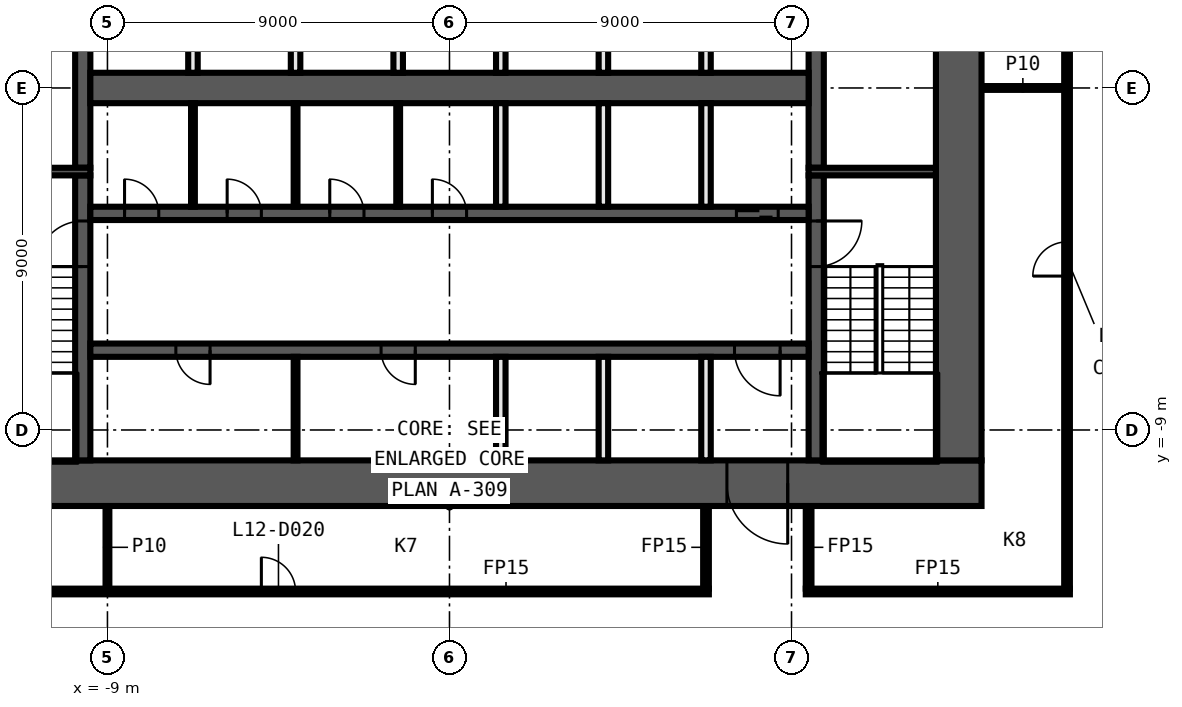
"""IFC4 building model, lengths in metres.
Left out: names, types, materials, properties, quantities, classifications, styles, units other than length and angle.
Written with IfcOpenShell. Run it as: python <this file> out.ifc"""

import sys

from ifc_helpers import new_model, si_unit, direction, frame, frame_2d, origin, place, context, subcontext, project, spatial, rectangle, extrude, element, fill, save


model = new_model("IFC4")
c1 = context("Model", 3, precision=1e-05, world=origin(), true_north=direction((0.0, 1.0)))
c2 = subcontext(c1, "Body", "Model", "MODEL_VIEW")
j1 = project(units=[si_unit("LENGTHUNIT", "METRE"), si_unit("PLANEANGLEUNIT", "RADIAN")], contexts=[c1])
p1 = place(None, origin())
s1 = spatial("IfcSite", under=j1, at=p1, CompositionType="ELEMENT")
p2 = place(p1, origin())
s2 = spatial("IfcBuilding", under=s1, at=p2, CompositionType="ELEMENT")
p3 = place(p2, frame((0.0, 0.0, 66.2)))
s3 = spatial("IfcBuildingStorey", under=s2, at=p3, CompositionType="ELEMENT", Elevation=66.2)
p4 = place(p3, frame((-16.325, -13.25, 0.0), z_axis=(0.0, 0.0, 1.0), x_axis=(1.0, 0.0, 0.0)))
e1 = element("IfcWall", 1, at=p4, inside=s3, PredefinedType="PARTITIONING", context=c2, shape_type="SweptSolid", body=[
    extrude(rectangle(XDim=23.15, YDim=0.15, at=frame_2d((11.575, 0.0))), origin(), (0.0, 0.0, 1.0), 3.3),
])
p5 = place(p4, frame((3.25, 0.0, 0.0)))
e2 = element("IfcOpeningElement", 2, at=p5, cuts=e1, PredefinedType="OPENING", context=c2, shape_type="SweptSolid", body=[
    extrude(rectangle(XDim=0.9, YDim=2.1, at=frame_2d((0.45, 1.05))), frame((0.0, 0.085, 0.0), z_axis=(0.0, -1.0, 0.0), x_axis=(1.0, 0.0, 0.0)), (0.0, 0.0, 1.0), 0.17),
])
p6 = place(p4, frame((11.375, 0.0, 0.0)))
e3 = element("IfcOpeningElement", 3, at=p6, cuts=e1, PredefinedType="OPENING", context=c2, shape_type="SweptSolid", body=[
    extrude(rectangle(XDim=0.9, YDim=2.1, at=frame_2d((0.45, 1.05))), frame((0.0, 0.085, 0.0), z_axis=(0.0, -1.0, 0.0), x_axis=(1.0, 0.0, 0.0)), (0.0, 0.0, 1.0), 0.17),
])
p7 = place(p3, frame((9.375, -13.25, 0.0), z_axis=(0.0, 0.0, 1.0), x_axis=(1.0, 0.0, 0.0)))
e4 = element("IfcWall", 4, at=p7, inside=s3, PredefinedType="PARTITIONING", context=c2, shape_type="SweptSolid", body=[
    extrude(rectangle(XDim=6.95, YDim=0.15, at=frame_2d((3.475, 0.0))), origin(), (0.0, 0.0, 1.0), 3.3),
])
p8 = place(p3, frame((14.0, 0.0, 0.0), z_axis=(0.0, 0.0, 1.0), x_axis=(1.0, 0.0, 0.0)))
e5 = element("IfcWall", 5, at=p8, inside=s3, PredefinedType="PARTITIONING", context=c2, shape_type="SweptSolid", body=[
    extrude(rectangle(XDim=2.175, YDim=0.1, at=frame_2d((1.087, 0.0))), origin(), (0.0, 0.0, 1.0), 3.3),
])
p9 = place(p3, frame((16.25, -13.175, 0.0), z_axis=(0.0, 0.0, 1.0), x_axis=(0.0, 1.0, 0.0)))
e6 = element("IfcWall", 6, at=p9, inside=s3, PredefinedType="PARTITIONING", context=c2, shape_type="SweptSolid", body=[
    extrude(rectangle(XDim=26.35, YDim=0.15, at=frame_2d((13.175, 0.0))), origin(), (0.0, 0.0, 1.0), 3.3),
])
p10 = place(p9, frame((8.225, 0.0, 0.0)))
e7 = element("IfcOpeningElement", 7, at=p10, cuts=e6, PredefinedType="OPENING", context=c2, shape_type="SweptSolid", body=[
    extrude(rectangle(XDim=0.9, YDim=2.1, at=frame_2d((0.45, 1.05))), frame((0.0, 0.085, 0.0), z_axis=(0.0, -1.0, 0.0), x_axis=(1.0, 0.0, 0.0)), (0.0, 0.0, 1.0), 0.17),
])
p11 = place(p9, frame((17.225, 0.0, 0.0)))
e8 = element("IfcOpeningElement", 8, at=p11, cuts=e6, PredefinedType="OPENING", context=c2, shape_type="SweptSolid", body=[
    extrude(rectangle(XDim=0.9, YDim=2.1, at=frame_2d((0.45, 1.05))), frame((0.0, 0.085, 0.0), z_axis=(0.0, -1.0, 0.0), x_axis=(1.0, 0.0, 0.0)), (0.0, 0.0, 1.0), 0.17),
])
for number, where, z_axis, x_axis in (
    (9, (9.45, -13.175, 0.0), (0.0, 0.0, 1.0), (0.0, 1.0, 0.0)),
    (10, (6.75, -13.175, 0.0), (0.0, 0.0, 1.0), (0.0, 1.0, 0.0)),
):
    element("IfcWall", number, at=place(p3, frame(where, z_axis=z_axis, x_axis=x_axis)), inside=s3, PredefinedType="PARTITIONING", context=c2, shape_type="SweptSolid", body=[
        extrude(rectangle(XDim=2.175, YDim=0.15, at=frame_2d((1.087, 0.0))), origin(), (0.0, 0.0, 1.0), 3.3),
    ])
p12 = place(p3, frame((-9.0, -13.175, 0.0), z_axis=(0.0, 0.0, 1.0), x_axis=(0.0, 1.0, 0.0)))
e11 = element("IfcWall", 11, at=p12, inside=s3, PredefinedType="PARTITIONING", context=c2, shape_type="SweptSolid", body=[
    extrude(rectangle(XDim=2.175, YDim=0.1, at=frame_2d((1.087, 0.0))), origin(), (0.0, 0.0, 1.0), 3.3),
])
p13 = place(p3, frame((14.0, -10.4, 0.0), z_axis=(0.0, 0.0, 1.0), x_axis=(-1.0, 0.0, 0.0)))
e12 = element("IfcWall", 12, at=p13, inside=s3, PredefinedType="SHEAR", context=c2, shape_type="SweptSolid", body=[
    extrude(rectangle(XDim=28.0, YDim=1.2, at=frame_2d((14.0, 0.0))), origin(), (0.0, 0.0, 1.0), 3.3),
])
p14 = place(p13, frame((5.1, 0.0, 0.0)))
e13 = element("IfcOpeningElement", 13, at=p14, cuts=e12, PredefinedType="OPENING", context=c2, shape_type="SweptSolid", body=[
    extrude(rectangle(XDim=1.6, YDim=2.1, at=frame_2d((0.8, 1.05))), frame((0.0, 0.61, 0.0), z_axis=(0.0, -1.0, 0.0), x_axis=(1.0, 0.0, 0.0)), (0.0, 0.0, 1.0), 1.22),
])
p15 = place(p3, frame((13.4, 9.8, 0.0), z_axis=(0.0, 0.0, 1.0), x_axis=(0.0, -1.0, 0.0)))
e14 = element("IfcWall", 14, at=p15, inside=s3, PredefinedType="SHEAR", context=c2, shape_type="SweptSolid", body=[
    extrude(rectangle(XDim=19.6, YDim=1.2, at=frame_2d((9.8, 0.0))), origin(), (0.0, 0.0, 1.0), 3.3),
])
p16 = place(p3, frame((9.65, -2.3, 0.0), z_axis=(0.0, 0.0, 1.0), x_axis=(0.0, -1.0, 0.0)))
e15 = element("IfcWall", 15, at=p16, inside=s3, PredefinedType="SHEAR", context=c2, shape_type="SweptSolid", body=[
    extrude(rectangle(XDim=7.5, YDim=0.4, at=frame_2d((3.75, 0.0))), origin(), (0.0, 0.0, 1.0), 3.3),
])
p17 = place(p16, frame((1.2, 0.0, 0.0)))
e16 = element("IfcOpeningElement", 16, at=p17, cuts=e15, PredefinedType="OPENING", context=c2, shape_type="SweptSolid", body=[
    extrude(rectangle(XDim=1.2, YDim=2.1, at=frame_2d((0.6, 1.05))), frame((0.0, 0.21, 0.0), z_axis=(0.0, -1.0, 0.0), x_axis=(1.0, 0.0, 0.0)), (0.0, 0.0, 1.0), 0.42),
])
p18 = place(p3, frame((9.65, 2.1, 0.0), z_axis=(0.0, 0.0, 1.0), x_axis=(0.0, -1.0, 0.0)))
e17 = element("IfcWall", 17, at=p18, inside=s3, PredefinedType="SHEAR", context=c2, shape_type="SweptSolid", body=[
    extrude(rectangle(XDim=4.2, YDim=0.4, at=frame_2d((2.1, 0.0))), origin(), (0.0, 0.0, 1.0), 3.3),
])
p19 = place(p18, frame((0.15, 0.0, 0.0)))
e18 = element("IfcOpeningElement", 18, at=p19, cuts=e17, PredefinedType="OPENING", context=c2, shape_type="SweptSolid", body=[
    extrude(rectangle(XDim=0.9, YDim=2.1, at=frame_2d((0.45, 1.05))), frame((0.0, 0.21, 0.0), z_axis=(0.0, -1.0, 0.0), x_axis=(1.0, 0.0, 0.0)), (0.0, 0.0, 1.0), 0.42),
])
p20 = place(p3, frame((-9.65, -9.8, 0.0), z_axis=(0.0, 0.0, 1.0), x_axis=(0.0, 1.0, 0.0)))
e19 = element("IfcWall", 19, at=p20, inside=s3, PredefinedType="SHEAR", context=c2, shape_type="SweptSolid", body=[
    extrude(rectangle(XDim=7.5, YDim=0.4, at=frame_2d((3.75, 0.0))), origin(), (0.0, 0.0, 1.0), 3.3),
])
p21 = place(p20, frame((5.1, 0.0, 0.0)))
e20 = element("IfcOpeningElement", 20, at=p21, cuts=e19, PredefinedType="OPENING", context=c2, shape_type="SweptSolid", body=[
    extrude(rectangle(XDim=1.2, YDim=2.1, at=frame_2d((0.6, 1.05))), frame((0.0, 0.21, 0.0), z_axis=(0.0, -1.0, 0.0), x_axis=(1.0, 0.0, 0.0)), (0.0, 0.0, 1.0), 0.42),
])
p22 = place(p3, frame((-9.65, -2.1, 0.0), z_axis=(0.0, 0.0, 1.0), x_axis=(0.0, 1.0, 0.0)))
e21 = element("IfcWall", 21, at=p22, inside=s3, PredefinedType="SHEAR", context=c2, shape_type="SweptSolid", body=[
    extrude(rectangle(XDim=4.2, YDim=0.4, at=frame_2d((2.1, 0.0))), origin(), (0.0, 0.0, 1.0), 3.3),
])
for number, where, z_axis, x_axis in (
    (22, (9.45, -2.2, 0.0), (0.0, 0.0, 1.0), (1.0, 0.0, 0.0)),
    (23, (-9.45, -2.2, 0.0), (0.0, 0.0, 1.0), (-1.0, 0.0, 0.0)),
):
    element("IfcWall", number, at=place(p3, frame(where, z_axis=z_axis, x_axis=x_axis)), inside=s3, PredefinedType="SHEAR", context=c2, shape_type="SweptSolid", body=[
        extrude(rectangle(XDim=3.35, YDim=0.2, at=frame_2d((1.675, 0.0))), origin(), (0.0, 0.0, 1.0), 3.3),
    ])
p23 = place(p3, frame((-9.45, -3.3, 0.0), z_axis=(0.0, 0.0, 1.0), x_axis=(1.0, 0.0, 0.0)))
e24 = element("IfcWall", 24, at=p23, inside=s3, PredefinedType="SHEAR", context=c2, shape_type="SweptSolid", body=[
    extrude(rectangle(XDim=18.9, YDim=0.35, at=frame_2d((9.45, 0.0))), origin(), (0.0, 0.0, 1.0), 3.3),
])
p24 = place(p23, frame((17.0, 0.0, 0.0)))
e25 = element("IfcOpeningElement", 25, at=p24, cuts=e24, PredefinedType="OPENING", context=c2, shape_type="SweptSolid", body=[
    extrude(rectangle(XDim=1.1, YDim=2.1, at=frame_2d((0.55, 1.05))), frame((0.0, 0.185, 0.0), z_axis=(0.0, -1.0, 0.0), x_axis=(1.0, 0.0, 0.0)), (0.0, 0.0, 1.0), 0.37),
])
p25 = place(p23, frame((0.9, 0.0, 0.0)))
e26 = element("IfcOpeningElement", 26, at=p25, cuts=e24, PredefinedType="OPENING", context=c2, shape_type="SweptSolid", body=[
    extrude(rectangle(XDim=0.9, YDim=2.1, at=frame_2d((0.45, 1.05))), frame((0.0, 0.185, 0.0), z_axis=(0.0, -1.0, 0.0), x_axis=(1.0, 0.0, 0.0)), (0.0, 0.0, 1.0), 0.37),
])
p26 = place(p23, frame((3.6, 0.0, 0.0)))
e27 = element("IfcOpeningElement", 27, at=p26, cuts=e24, PredefinedType="OPENING", context=c2, shape_type="SweptSolid", body=[
    extrude(rectangle(XDim=0.9, YDim=2.1, at=frame_2d((0.45, 1.05))), frame((0.0, 0.185, 0.0), z_axis=(0.0, -1.0, 0.0), x_axis=(1.0, 0.0, 0.0)), (0.0, 0.0, 1.0), 0.37),
])
p27 = place(p23, frame((6.3, 0.0, 0.0)))
e28 = element("IfcOpeningElement", 28, at=p27, cuts=e24, PredefinedType="OPENING", context=c2, shape_type="SweptSolid", body=[
    extrude(rectangle(XDim=0.9, YDim=2.1, at=frame_2d((0.45, 1.05))), frame((0.0, 0.185, 0.0), z_axis=(0.0, -1.0, 0.0), x_axis=(1.0, 0.0, 0.0)), (0.0, 0.0, 1.0), 0.37),
])
p28 = place(p23, frame((9.0, 0.0, 0.0)))
e29 = element("IfcOpeningElement", 29, at=p28, cuts=e24, PredefinedType="OPENING", context=c2, shape_type="SweptSolid", body=[
    extrude(rectangle(XDim=0.9, YDim=2.1, at=frame_2d((0.45, 1.05))), frame((0.0, 0.185, 0.0), z_axis=(0.0, -1.0, 0.0), x_axis=(1.0, 0.0, 0.0)), (0.0, 0.0, 1.0), 0.37),
])
p29 = place(p3, frame((9.45, -6.9, 0.0), z_axis=(0.0, 0.0, 1.0), x_axis=(-1.0, 0.0, 0.0)))
e30 = element("IfcWall", 30, at=p29, inside=s3, PredefinedType="SHEAR", context=c2, shape_type="SweptSolid", body=[
    extrude(rectangle(XDim=18.9, YDim=0.35, at=frame_2d((9.45, 0.0))), origin(), (0.0, 0.0, 1.0), 3.3),
])
p30 = place(p29, frame((0.75, 0.0, 0.0)))
e31 = element("IfcOpeningElement", 31, at=p30, cuts=e30, PredefinedType="OPENING", context=c2, shape_type="SweptSolid", body=[
    extrude(rectangle(XDim=1.2, YDim=2.1, at=frame_2d((0.6, 1.05))), frame((0.0, 0.185, 0.0), z_axis=(0.0, -1.0, 0.0), x_axis=(1.0, 0.0, 0.0)), (0.0, 0.0, 1.0), 0.37),
])
p31 = place(p29, frame((15.75, 0.0, 0.0)))
e32 = element("IfcOpeningElement", 32, at=p31, cuts=e30, PredefinedType="OPENING", context=c2, shape_type="SweptSolid", body=[
    extrude(rectangle(XDim=0.9, YDim=2.1, at=frame_2d((0.45, 1.05))), frame((0.0, 0.185, 0.0), z_axis=(0.0, -1.0, 0.0), x_axis=(1.0, 0.0, 0.0)), (0.0, 0.0, 1.0), 0.37),
])
p32 = place(p29, frame((10.35, 0.0, 0.0)))
e33 = element("IfcOpeningElement", 33, at=p32, cuts=e30, PredefinedType="OPENING", context=c2, shape_type="SweptSolid", body=[
    extrude(rectangle(XDim=0.9, YDim=2.1, at=frame_2d((0.45, 1.05))), frame((0.0, 0.185, 0.0), z_axis=(0.0, -1.0, 0.0), x_axis=(1.0, 0.0, 0.0)), (0.0, 0.0, 1.0), 0.37),
])
p33 = place(p3, frame((-9.45, 0.0, 0.0), z_axis=(0.0, 0.0, 1.0), x_axis=(1.0, 0.0, 0.0)))
e34 = element("IfcWall", 34, at=p33, inside=s3, PredefinedType="SHEAR", context=c2, shape_type="SweptSolid", body=[
    extrude(rectangle(XDim=18.9, YDim=0.8, at=frame_2d((9.45, 0.0))), origin(), (0.0, 0.0, 1.0), 3.3),
])
for number, where, z_axis, x_axis in (
    (35, (6.75, -9.8, 0.0), (0.0, 0.0, 1.0), (0.0, 1.0, 0.0)),
    (36, (6.75, -3.125, 0.0), (0.0, 0.0, 1.0), (0.0, 1.0, 0.0)),
    (37, (6.75, 0.4, 0.0), (0.0, 0.0, 1.0), (0.0, 1.0, 0.0)),
    (38, (4.05, -9.8, 0.0), (0.0, 0.0, 1.0), (0.0, 1.0, 0.0)),
    (39, (4.05, -3.125, 0.0), (0.0, 0.0, 1.0), (0.0, 1.0, 0.0)),
    (40, (4.05, 0.4, 0.0), (0.0, 0.0, 1.0), (0.0, 1.0, 0.0)),
    (41, (1.35, -9.8, 0.0), (0.0, 0.0, 1.0), (0.0, 1.0, 0.0)),
    (42, (1.35, -3.125, 0.0), (0.0, 0.0, 1.0), (0.0, 1.0, 0.0)),
    (43, (1.35, 0.4, 0.0), (0.0, 0.0, 1.0), (0.0, 1.0, 0.0)),
):
    element("IfcWall", number, at=place(p3, frame(where, z_axis=z_axis, x_axis=x_axis)), inside=s3, PredefinedType="SOLIDWALL", context=c2, shape_type="SweptSolid", body=[
        extrude(rectangle(XDim=2.725, YDim=0.25, at=frame_2d((1.363, 0.0))), origin(), (0.0, 0.0, 1.0), 3.3),
    ])
p34 = place(p3, frame((-1.35, -3.125, 0.0), z_axis=(0.0, 0.0, 1.0), x_axis=(0.0, 1.0, 0.0)))
e44 = element("IfcWall", 44, at=p34, inside=s3, PredefinedType="PARTITIONING", context=c2, shape_type="SweptSolid", body=[
    extrude(rectangle(XDim=2.725, YDim=0.1, at=frame_2d((1.363, 0.0))), origin(), (0.0, 0.0, 1.0), 3.3),
])
p35 = place(p3, frame((-1.35, 0.4, 0.0), z_axis=(0.0, 0.0, 1.0), x_axis=(0.0, 1.0, 0.0)))
e45 = element("IfcWall", 45, at=p35, inside=s3, PredefinedType="SOLIDWALL", context=c2, shape_type="SweptSolid", body=[
    extrude(rectangle(XDim=2.725, YDim=0.25, at=frame_2d((1.363, 0.0))), origin(), (0.0, 0.0, 1.0), 3.3),
])
for number, where, z_axis, x_axis in (
    (46, (-4.05, -9.8, 0.0), (0.0, 0.0, 1.0), (0.0, 1.0, 0.0)),
    (47, (-4.05, -3.125, 0.0), (0.0, 0.0, 1.0), (0.0, 1.0, 0.0)),
):
    element("IfcWall", number, at=place(p3, frame(where, z_axis=z_axis, x_axis=x_axis)), inside=s3, PredefinedType="PARTITIONING", context=c2, shape_type="SweptSolid", body=[
        extrude(rectangle(XDim=2.725, YDim=0.1, at=frame_2d((1.363, 0.0))), origin(), (0.0, 0.0, 1.0), 3.3),
    ])
p36 = place(p3, frame((-4.05, 0.4, 0.0), z_axis=(0.0, 0.0, 1.0), x_axis=(0.0, 1.0, 0.0)))
e48 = element("IfcWall", 48, at=p36, inside=s3, PredefinedType="SOLIDWALL", context=c2, shape_type="SweptSolid", body=[
    extrude(rectangle(XDim=2.725, YDim=0.25, at=frame_2d((1.363, 0.0))), origin(), (0.0, 0.0, 1.0), 3.3),
])
p37 = place(p3, frame((-6.75, -3.125, 0.0), z_axis=(0.0, 0.0, 1.0), x_axis=(0.0, 1.0, 0.0)))
e49 = element("IfcWall", 49, at=p37, inside=s3, PredefinedType="PARTITIONING", context=c2, shape_type="SweptSolid", body=[
    extrude(rectangle(XDim=2.725, YDim=0.1, at=frame_2d((1.363, 0.0))), origin(), (0.0, 0.0, 1.0), 3.3),
])
p38 = place(p3, frame((-6.75, 0.4, 0.0), z_axis=(0.0, 0.0, 1.0), x_axis=(0.0, 1.0, 0.0)))
e50 = element("IfcWall", 50, at=p38, inside=s3, PredefinedType="SOLIDWALL", context=c2, shape_type="SweptSolid", body=[
    extrude(rectangle(XDim=2.725, YDim=0.25, at=frame_2d((1.363, 0.0))), origin(), (0.0, 0.0, 1.0), 3.3),
])
p39 = place(p6, origin())
e51 = element("IfcDoor", 51, at=p39, inside=s3, OperationType="SINGLE_SWING_RIGHT", PredefinedType="DOOR", context=c2, shape_type="SweptSolid", body=[
    extrude(rectangle(XDim=0.9, YDim=2.1, at=frame_2d((0.45, 1.05))), frame((0.0, 0.025, 0.0), z_axis=(0.0, -1.0, 0.0), x_axis=(1.0, 0.0, 0.0)), (0.0, 0.0, 1.0), 0.05),
])
fill(e3, e51)
p40 = place(p10, origin())
e52 = element("IfcDoor", 52, at=p40, inside=s3, OperationType="SINGLE_SWING_LEFT", PredefinedType="DOOR", context=c2, shape_type="SweptSolid", body=[
    extrude(rectangle(XDim=0.9, YDim=2.1, at=frame_2d((0.45, 1.05))), frame((0.0, 0.025, 0.0), z_axis=(0.0, -1.0, 0.0), x_axis=(1.0, 0.0, 0.0)), (0.0, 0.0, 1.0), 0.05),
])
fill(e7, e52)
p41 = place(p24, origin())
e53 = element("IfcDoor", 53, at=p41, inside=s3, OperationType="DOUBLE_DOOR_SLIDING", PredefinedType="DOOR", context=c2, shape_type="SweptSolid", body=[
    extrude(rectangle(XDim=1.1, YDim=2.1, at=frame_2d((0.55, 1.05))), frame((0.0, 0.025, 0.0), z_axis=(0.0, -1.0, 0.0), x_axis=(1.0, 0.0, 0.0)), (0.0, 0.0, 1.0), 0.05),
])
fill(e25, e53)
p42 = place(p14, origin())
e54 = element("IfcDoor", 54, at=p42, inside=s3, OperationType="DOUBLE_DOOR_SINGLE_SWING", PredefinedType="DOOR", context=c2, shape_type="SweptSolid", body=[
    extrude(rectangle(XDim=1.6, YDim=2.1, at=frame_2d((0.8, 1.05))), frame((0.0, 0.025, 0.0), z_axis=(0.0, -1.0, 0.0), x_axis=(1.0, 0.0, 0.0)), (0.0, 0.0, 1.0), 0.05),
])
fill(e13, e54)
p43 = place(p30, origin())
e55 = element("IfcDoor", 55, at=p43, inside=s3, OperationType="SINGLE_SWING_LEFT", PredefinedType="DOOR", context=c2, shape_type="SweptSolid", body=[
    extrude(rectangle(XDim=1.2, YDim=2.1, at=frame_2d((0.6, 1.05))), frame((0.0, 0.025, 0.0), z_axis=(0.0, -1.0, 0.0), x_axis=(1.0, 0.0, 0.0)), (0.0, 0.0, 1.0), 0.05),
])
fill(e31, e55)
p44 = place(p25, origin())
e56 = element("IfcDoor", 56, at=p44, inside=s3, OperationType="SINGLE_SWING_RIGHT", PredefinedType="DOOR", context=c2, shape_type="SweptSolid", body=[
    extrude(rectangle(XDim=0.9, YDim=2.1, at=frame_2d((0.45, 1.05))), frame((0.0, 0.025, 0.0), z_axis=(0.0, -1.0, 0.0), x_axis=(1.0, 0.0, 0.0)), (0.0, 0.0, 1.0), 0.05),
])
fill(e26, e56)
p45 = place(p26, origin())
e57 = element("IfcDoor", 57, at=p45, inside=s3, OperationType="SINGLE_SWING_LEFT", PredefinedType="DOOR", context=c2, shape_type="SweptSolid", body=[
    extrude(rectangle(XDim=0.9, YDim=2.1, at=frame_2d((0.45, 1.05))), frame((0.0, 0.025, 0.0), z_axis=(0.0, -1.0, 0.0), x_axis=(1.0, 0.0, 0.0)), (0.0, 0.0, 1.0), 0.05),
])
fill(e27, e57)
p46 = place(p27, origin())
e58 = element("IfcDoor", 58, at=p46, inside=s3, OperationType="SINGLE_SWING_RIGHT", PredefinedType="DOOR", context=c2, shape_type="SweptSolid", body=[
    extrude(rectangle(XDim=0.9, YDim=2.1, at=frame_2d((0.45, 1.05))), frame((0.0, 0.025, 0.0), z_axis=(0.0, -1.0, 0.0), x_axis=(1.0, 0.0, 0.0)), (0.0, 0.0, 1.0), 0.05),
])
fill(e28, e58)
p47 = place(p28, origin())
e59 = element("IfcDoor", 59, at=p47, inside=s3, OperationType="SINGLE_SWING_LEFT", PredefinedType="DOOR", context=c2, shape_type="SweptSolid", body=[
    extrude(rectangle(XDim=0.9, YDim=2.1, at=frame_2d((0.45, 1.05))), frame((0.0, 0.025, 0.0), z_axis=(0.0, -1.0, 0.0), x_axis=(1.0, 0.0, 0.0)), (0.0, 0.0, 1.0), 0.05),
])
fill(e29, e59)
p48 = place(p31, origin())
e60 = element("IfcDoor", 60, at=p48, inside=s3, OperationType="SINGLE_SWING_RIGHT", PredefinedType="DOOR", context=c2, shape_type="SweptSolid", body=[
    extrude(rectangle(XDim=0.9, YDim=2.1, at=frame_2d((0.45, 1.05))), frame((0.0, 0.025, 0.0), z_axis=(0.0, -1.0, 0.0), x_axis=(1.0, 0.0, 0.0)), (0.0, 0.0, 1.0), 0.05),
])
fill(e32, e60)
p49 = place(p32, origin())
e61 = element("IfcDoor", 61, at=p49, inside=s3, OperationType="SINGLE_SWING_LEFT", PredefinedType="DOOR", context=c2, shape_type="SweptSolid", body=[
    extrude(rectangle(XDim=0.9, YDim=2.1, at=frame_2d((0.45, 1.05))), frame((0.0, 0.025, 0.0), z_axis=(0.0, -1.0, 0.0), x_axis=(1.0, 0.0, 0.0)), (0.0, 0.0, 1.0), 0.05),
])
fill(e33, e61)
p50 = place(p17, origin())
e62 = element("IfcDoor", 62, at=p50, inside=s3, OperationType="SINGLE_SWING_RIGHT", PredefinedType="DOOR", context=c2, shape_type="SweptSolid", body=[
    extrude(rectangle(XDim=1.2, YDim=2.1, at=frame_2d((0.6, 1.05))), frame((0.0, 0.025, 0.0), z_axis=(0.0, -1.0, 0.0), x_axis=(1.0, 0.0, 0.0)), (0.0, 0.0, 1.0), 0.05),
])
fill(e16, e62)
p51 = place(p21, origin())
e63 = element("IfcDoor", 63, at=p51, inside=s3, OperationType="SINGLE_SWING_LEFT", PredefinedType="DOOR", context=c2, shape_type="SweptSolid", body=[
    extrude(rectangle(XDim=1.2, YDim=2.1, at=frame_2d((0.6, 1.05))), frame((0.0, 0.025, 0.0), z_axis=(0.0, -1.0, 0.0), x_axis=(1.0, 0.0, 0.0)), (0.0, 0.0, 1.0), 0.05),
])
fill(e20, e63)
save(model, sys.argv[1])
